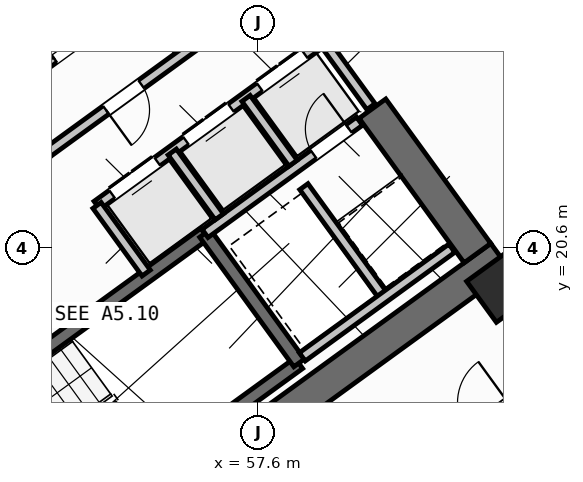
"""IFC4 building model, lengths in metres.
Left out: names, types, materials, properties, quantities, classifications, styles, units other than length and angle.
Written with IfcOpenShell. Run it as: python <this file> out.ifc"""

import sys

from ifc_helpers import new_model, si_unit, direction, frame, frame_2d, origin, origin_2d, place, context, subcontext, project, spatial, rectangle, hollow_rectangle, extrude, source, transform, mapped, element, fill, save


model = new_model("IFC4")
c1 = context("Model", 3, precision=1e-05, world=origin(), true_north=direction((0.0, 1.0)))
c2 = subcontext(c1, "Body", "Model", "MODEL_VIEW")
j1 = project(units=[si_unit("LENGTHUNIT", "METRE"), si_unit("PLANEANGLEUNIT", "RADIAN")], contexts=[c1])
p1 = place(None, origin())
s1 = spatial("IfcSite", under=j1, at=p1, CompositionType="ELEMENT")
p2 = place(p1, origin())
s2 = spatial("IfcBuilding", under=s1, at=p2, CompositionType="ELEMENT")
p3 = place(p2, frame((0.0, 0.0, 56.4)))
s3 = spatial("IfcBuildingStorey", under=s2, at=p3, CompositionType="ELEMENT", Elevation=56.4)
p4 = place(p3, frame((52.318, 13.11, 0.0), z_axis=(0.0, 0.0, 1.0), x_axis=(0.809019445368, 0.587781878776, 0.0)))
e1 = element("IfcWall", 1, at=p4, inside=s3, PredefinedType="SHEAR", context=c2, shape_type="SweptSolid", body=[
    extrude(rectangle(XDim=12.44, YDim=0.65, at=frame_2d((6.22, 0.0))), origin(), (0.0, 0.0, 1.0), 3.35),
])
p5 = place(p3, frame((44.325, 24.113, 0.0), z_axis=(0.0, 0.0, 1.0), x_axis=(0.809012664862, 0.58779121131, 0.0)))
e2 = element("IfcWall", 2, at=p5, inside=s3, PredefinedType="SHEAR", context=c2, shape_type="SweptSolid", body=[
    extrude(rectangle(XDim=12.44, YDim=0.65, at=frame_2d((6.22, 0.0))), origin(), (0.0, 0.0, 1.0), 3.35),
])
p6 = place(p3, frame((61.929, 20.494, 0.0), z_axis=(0.0, 0.0, 1.0), x_axis=(-0.58782982593, 0.808984607855, 0.0)))
e3 = element("IfcWall", 3, at=p6, inside=s3, PredefinedType="SHEAR", context=c2, shape_type="SweptSolid", body=[
    extrude(rectangle(XDim=3.525, YDim=0.65, at=frame_2d((1.762, 0.0))), origin(), (0.0, 0.0, 1.0), 3.35),
])
m1 = source(origin(), c2, "Body", "SweptSolid", [
    extrude(hollow_rectangle(XDim=1.0, YDim=1.0, WallThickness=0.04, at=origin_2d()), origin(), (0.0, 0.0, 1.0), 3.6),
])
p7 = place(p3, frame((62.414, 19.827, 0.0), z_axis=(0.0, 0.0, 1.0), x_axis=(0.809016994375, 0.587785252292, 0.0)))
e4 = element("IfcColumn", 4, at=p7, inside=s3, PredefinedType="COLUMN", context=c2, shape_type="MappedRepresentation", body=[
    mapped(m1, transform((0.0, 0.0, 0.0), scale=1.0)),
])
p8 = place(p3, frame((58.455, 35.484, 0.0), z_axis=(0.0, 0.0, 1.0), x_axis=(0.587783625747, -0.809018176127, 0.0)))
e5 = element("IfcWall", 5, at=p8, inside=s3, PredefinedType="STANDARD", context=c2, shape_type="SweptSolid", body=[
    extrude(rectangle(XDim=21.587, YDim=0.32, at=frame_2d((10.794, 0.0))), origin(), (0.0, 0.0, 1.0), 2.725),
])
p9 = place(p8, frame((1.54, 0.0, 0.85)))
e6 = element("IfcOpeningElement", 6, at=p9, cuts=e5, PredefinedType="OPENING", context=c2, shape_type="SweptSolid", body=[
    extrude(rectangle(XDim=1.5, YDim=1.5, at=frame_2d((0.75, 0.75))), frame((0.0, 0.17, 0.0), z_axis=(0.0, -1.0, 0.0), x_axis=(1.0, 0.0, 0.0)), (0.0, 0.0, 1.0), 0.34),
])
p10 = place(p8, frame((4.695, 0.0, 0.85)))
e7 = element("IfcOpeningElement", 7, at=p10, cuts=e5, PredefinedType="OPENING", context=c2, shape_type="SweptSolid", body=[
    extrude(rectangle(XDim=1.8, YDim=1.5, at=frame_2d((0.9, 0.75))), frame((0.0, 0.17, 0.0), z_axis=(0.0, -1.0, 0.0), x_axis=(1.0, 0.0, 0.0)), (0.0, 0.0, 1.0), 0.34),
])
p11 = place(p8, frame((13.009, 0.0, 1.0)))
e8 = element("IfcOpeningElement", 8, at=p11, cuts=e5, PredefinedType="OPENING", context=c2, shape_type="SweptSolid", body=[
    extrude(rectangle(XDim=0.9, YDim=1.25, at=frame_2d((0.45, 0.625))), frame((0.0, 0.17, 0.0), z_axis=(0.0, -1.0, 0.0), x_axis=(1.0, 0.0, 0.0)), (0.0, 0.0, 1.0), 0.34),
])
p12 = place(p8, frame((16.092, 0.0, 0.95)))
e9 = element("IfcOpeningElement", 9, at=p12, cuts=e5, PredefinedType="OPENING", context=c2, shape_type="SweptSolid", body=[
    extrude(rectangle(XDim=1.2, YDim=1.4, at=frame_2d((0.6, 0.7))), frame((0.0, 0.17, 0.0), z_axis=(0.0, -1.0, 0.0), x_axis=(1.0, 0.0, 0.0)), (0.0, 0.0, 1.0), 0.34),
])
p13 = place(p8, frame((19.085, 0.0, 1.0)))
e10 = element("IfcOpeningElement", 10, at=p13, cuts=e5, PredefinedType="OPENING", context=c2, shape_type="SweptSolid", body=[
    extrude(rectangle(XDim=0.9, YDim=1.25, at=frame_2d((0.45, 0.625))), frame((0.0, 0.17, 0.0), z_axis=(0.0, -1.0, 0.0), x_axis=(1.0, 0.0, 0.0)), (0.0, 0.0, 1.0), 0.34),
])
p14 = place(p3, frame((71.098, 17.731, 0.0), z_axis=(0.0, 0.0, 1.0), x_axis=(-0.809021120468, -0.587779573171, 0.0)))
e11 = element("IfcWall", 11, at=p14, inside=s3, PredefinedType="STANDARD", context=c2, shape_type="SweptSolid", body=[
    extrude(rectangle(XDim=17.588, YDim=0.32, at=frame_2d((8.794, 0.0))), origin(), (0.0, 0.0, 1.0), 3.35),
])
p15 = place(p14, frame((1.624, 0.0, 0.0)))
e12 = element("IfcOpeningElement", 12, at=p15, cuts=e11, PredefinedType="OPENING", context=c2, shape_type="SweptSolid", body=[
    extrude(rectangle(XDim=1.05, YDim=2.15, at=frame_2d((0.525, 1.075))), frame((0.0, 0.17, 0.0), z_axis=(0.0, -1.0, 0.0), x_axis=(1.0, 0.0, 0.0)), (0.0, 0.0, 1.0), 0.34),
])
p16 = place(p14, frame((4.104, 0.0, 1.0)))
e13 = element("IfcOpeningElement", 13, at=p16, cuts=e11, PredefinedType="OPENING", context=c2, shape_type="SweptSolid", body=[
    extrude(rectangle(XDim=0.9, YDim=1.25, at=frame_2d((0.45, 0.625))), frame((0.0, 0.17, 0.0), z_axis=(0.0, -1.0, 0.0), x_axis=(1.0, 0.0, 0.0)), (0.0, 0.0, 1.0), 0.34),
])
p17 = place(p14, frame((7.879, 0.0, 0.85)))
e14 = element("IfcOpeningElement", 14, at=p17, cuts=e11, PredefinedType="OPENING", context=c2, shape_type="SweptSolid", body=[
    extrude(rectangle(XDim=1.8, YDim=1.5, at=frame_2d((0.9, 0.75))), frame((0.0, 0.17, 0.0), z_axis=(0.0, -1.0, 0.0), x_axis=(1.0, 0.0, 0.0)), (0.0, 0.0, 1.0), 0.34),
])
p18 = place(p14, frame((13.529, 0.0, 0.85)))
e15 = element("IfcOpeningElement", 15, at=p18, cuts=e11, PredefinedType="OPENING", context=c2, shape_type="SweptSolid", body=[
    extrude(rectangle(XDim=1.5, YDim=1.5, at=frame_2d((0.75, 0.75))), frame((0.0, 0.17, 0.0), z_axis=(0.0, -1.0, 0.0), x_axis=(1.0, 0.0, 0.0)), (0.0, 0.0, 1.0), 0.34),
])
p19 = place(p3, frame((49.863, 23.44, 0.0), z_axis=(0.0, 0.0, 1.0), x_axis=(0.809003474932, 0.587803859759, 0.0)))
e16 = element("IfcWall", 16, at=p19, inside=s3, PredefinedType="SHEAR", context=c2, shape_type="SweptSolid", body=[
    extrude(rectangle(XDim=7.46, YDim=0.26, at=frame_2d((3.73, 0.0))), origin(), (0.0, 0.0, 1.0), 3.35),
])
p20 = place(p19, frame((0.36, 0.0, 0.0)))
e17 = element("IfcOpeningElement", 17, at=p20, cuts=e16, PredefinedType="OPENING", context=c2, shape_type="SweptSolid", body=[
    extrude(rectangle(XDim=0.86, YDim=2.05, at=frame_2d((0.43, 1.025))), frame((0.0, 0.14, 0.0), z_axis=(0.0, -1.0, 0.0), x_axis=(1.0, 0.0, 0.0)), (0.0, 0.0, 1.0), 0.28),
])
p21 = place(p3, frame((52.472, 14.013, 0.0), z_axis=(0.0, 0.0, 1.0), x_axis=(0.809028366311, 0.587769599847, 0.0)))
e18 = element("IfcWall", 18, at=p21, inside=s3, PredefinedType="SHEAR", context=c2, shape_type="SweptSolid", body=[
    extrude(rectangle(XDim=7.33, YDim=0.26, at=frame_2d((3.665, 0.0))), origin(), (0.0, 0.0, 1.0), 3.35),
])
p22 = place(p3, frame((50.615, 16.57, 0.0), z_axis=(0.0, 0.0, 1.0), x_axis=(0.809028366311, 0.587769599847, 0.0)))
e19 = element("IfcWall", 19, at=p22, inside=s3, PredefinedType="SHEAR", context=c2, shape_type="SweptSolid", body=[
    extrude(rectangle(XDim=7.33, YDim=0.26, at=frame_2d((3.665, 0.0))), origin(), (0.0, 0.0, 1.0), 3.35),
])
p23 = place(p22, frame((0.22, 0.0, 0.0)))
e20 = element("IfcOpeningElement", 20, at=p23, cuts=e19, PredefinedType="OPENING", context=c2, shape_type="SweptSolid", body=[
    extrude(rectangle(XDim=1.1, YDim=2.1, at=frame_2d((0.55, 1.05))), frame((0.0, 0.14, 0.0), z_axis=(0.0, -1.0, 0.0), x_axis=(1.0, 0.0, 0.0)), (0.0, 0.0, 1.0), 0.28),
])
p24 = place(p3, frame((58.41, 18.327, 0.0), z_axis=(0.0, 0.0, 1.0), x_axis=(-0.58776738483, 0.809029975545, 0.0)))
e21 = element("IfcWall", 21, at=p24, inside=s3, PredefinedType="SHEAR", context=c2, shape_type="SweptSolid", body=[
    extrude(rectangle(XDim=3.16, YDim=0.26, at=frame_2d((1.58, 0.0))), origin(), (0.0, 0.0, 1.0), 3.35),
])
p25 = place(p3, frame((56.553, 20.884, 0.0), z_axis=(0.0, 0.0, 1.0), x_axis=(0.809035789462, 0.587759382205, 0.0)))
e22 = element("IfcWall", 22, at=p25, inside=s3, PredefinedType="STANDARD", context=c2, shape_type="SweptSolid", body=[
    extrude(rectangle(XDim=3.768, YDim=0.2, at=frame_2d((1.884, 0.0))), origin(), (0.0, 0.0, 1.0), 3.34),
])
p26 = place(p25, frame((2.65, 0.0, 0.0)))
e23 = element("IfcOpeningElement", 23, at=p26, cuts=e22, PredefinedType="OPENING", context=c2, shape_type="SweptSolid", body=[
    extrude(rectangle(XDim=0.86, YDim=2.05, at=frame_2d((0.43, 1.025))), frame((0.0, 0.11, 0.0), z_axis=(0.0, -1.0, 0.0), x_axis=(1.0, 0.0, 0.0)), (0.0, 0.0, 1.0), 0.22),
])
p27 = place(p3, frame((54.421, 21.436, 0.0), z_axis=(0.0, 0.0, 1.0), x_axis=(0.809013710463, 0.587789772183, 0.0)))
e24 = element("IfcWall", 24, at=p27, inside=s3, PredefinedType="STANDARD", context=c2, shape_type="SweptSolid", body=[
    extrude(rectangle(XDim=5.36, YDim=0.2, at=frame_2d((2.68, 0.0))), origin(), (0.0, 0.0, 1.0), 3.34),
])
p28 = place(p27, frame((0.37, 0.0, 0.0)))
e25 = element("IfcOpeningElement", 25, at=p28, cuts=e24, PredefinedType="OPENING", context=c2, shape_type="SweptSolid", body=[
    extrude(rectangle(XDim=1.1, YDim=2.15, at=frame_2d((0.55, 1.075))), frame((0.0, 0.11, 0.0), z_axis=(0.0, -1.0, 0.0), x_axis=(1.0, 0.0, 0.0)), (0.0, 0.0, 1.0), 0.22),
])
p29 = place(p27, frame((2.17, 0.0, 0.0)))
e26 = element("IfcOpeningElement", 26, at=p29, cuts=e24, PredefinedType="OPENING", context=c2, shape_type="SweptSolid", body=[
    extrude(rectangle(XDim=1.1, YDim=2.15, at=frame_2d((0.55, 1.075))), frame((0.0, 0.11, 0.0), z_axis=(0.0, -1.0, 0.0), x_axis=(1.0, 0.0, 0.0)), (0.0, 0.0, 1.0), 0.22),
])
p30 = place(p27, frame((3.97, 0.0, 0.0)))
e27 = element("IfcOpeningElement", 27, at=p30, cuts=e24, PredefinedType="OPENING", context=c2, shape_type="SweptSolid", body=[
    extrude(rectangle(XDim=1.1, YDim=2.15, at=frame_2d((0.55, 1.075))), frame((0.0, 0.11, 0.0), z_axis=(0.0, -1.0, 0.0), x_axis=(1.0, 0.0, 0.0)), (0.0, 0.0, 1.0), 0.22),
])
p31 = place(p3, frame((55.391, 20.102, 0.0), z_axis=(0.0, 0.0, 1.0), x_axis=(-0.58778447739, 0.809017557374, 0.0)))
e28 = element("IfcWall", 28, at=p31, inside=s3, PredefinedType="STANDARD", context=c2, shape_type="SweptSolid", body=[
    extrude(rectangle(XDim=1.65, YDim=0.2, at=frame_2d((0.825, 0.0))), origin(), (0.0, 0.0, 1.0), 3.34),
])
p32 = place(p3, frame((56.834, 21.212, 0.0), z_axis=(0.0, 0.0, 1.0), x_axis=(-0.58776738483, 0.809029975545, 0.0)))
e29 = element("IfcWall", 29, at=p32, inside=s3, PredefinedType="STANDARD", context=c2, shape_type="SweptSolid", body=[
    extrude(rectangle(XDim=1.58, YDim=0.2, at=frame_2d((0.79, 0.0))), origin(), (0.0, 0.0, 1.0), 3.34),
])
p33 = place(p3, frame((58.29, 22.27, 0.0), z_axis=(0.0, 0.0, 1.0), x_axis=(-0.587840865826, 0.808976585857, 0.0)))
e30 = element("IfcWall", 30, at=p33, inside=s3, PredefinedType="STANDARD", context=c2, shape_type="SweptSolid", body=[
    extrude(rectangle(XDim=1.58, YDim=0.2, at=frame_2d((0.79, 0.0))), origin(), (0.0, 0.0, 1.0), 3.34),
])
p34 = place(p3, frame((60.067, 19.655, 0.0), z_axis=(0.0, 0.0, 1.0), x_axis=(-0.587800520745, 0.809005900975, 0.0)))
e31 = element("IfcWall", 31, at=p34, inside=s3, PredefinedType="STANDARD", context=c2, shape_type="SweptSolid", body=[
    extrude(rectangle(XDim=2.66, YDim=0.2, at=frame_2d((1.33, 0.0))), origin(), (0.0, 0.0, 1.0), 3.34),
])
p35 = place(p3, frame((58.472, 18.447, 0.0), z_axis=(0.0, 0.0, 1.0), x_axis=(0.809022487728, 0.587777691266, 0.0)))
e32 = element("IfcWall", 32, at=p35, inside=s3, PredefinedType="STANDARD", context=c2, shape_type="SweptSolid", body=[
    extrude(rectangle(XDim=3.648, YDim=0.2, at=frame_2d((1.824, 0.0))), origin(), (0.0, 0.0, 1.0), 3.34),
])
p36 = place(p3, frame((56.111, 24.419, 0.0), z_axis=(0.0, 0.0, 1.0), x_axis=(-0.58777848983, 0.809021907548, 0.0)))
e33 = element("IfcWall", 33, at=p36, inside=s3, PredefinedType="STANDARD", context=c2, shape_type="SweptSolid", body=[
    extrude(rectangle(XDim=2.88, YDim=0.2, at=frame_2d((1.44, 0.0))), origin(), (0.0, 0.0, 1.0), 3.34),
])
p37 = place(p3, frame((53.425, 22.468, 0.0), z_axis=(0.0, 0.0, 1.0), x_axis=(0.80902705128, 0.587771409902, 0.0)))
e34 = element("IfcWall", 34, at=p37, inside=s3, PredefinedType="STANDARD", context=c2, shape_type="SweptSolid", body=[
    extrude(rectangle(XDim=5.368, YDim=0.2, at=frame_2d((2.684, 0.0))), origin(), (0.0, 0.0, 1.0), 3.34),
])
p38 = place(p37, frame((4.28, 0.0, 0.0)))
e35 = element("IfcOpeningElement", 35, at=p38, cuts=e34, PredefinedType="OPENING", context=c2, shape_type="SweptSolid", body=[
    extrude(rectangle(XDim=0.86, YDim=2.05, at=frame_2d((0.43, 1.025))), frame((0.0, 0.11, 0.0), z_axis=(0.0, -1.0, 0.0), x_axis=(1.0, 0.0, 0.0)), (0.0, 0.0, 1.0), 0.22),
])
p39 = place(p37, frame((1.45, 0.0, 0.0)))
e36 = element("IfcOpeningElement", 36, at=p39, cuts=e34, PredefinedType="OPENING", context=c2, shape_type="SweptSolid", body=[
    extrude(rectangle(XDim=0.86, YDim=2.05, at=frame_2d((0.43, 1.025))), frame((0.0, 0.11, 0.0), z_axis=(0.0, -1.0, 0.0), x_axis=(1.0, 0.0, 0.0)), (0.0, 0.0, 1.0), 0.22),
])
p40 = place(p3, frame((52.618, 23.612, 0.0), z_axis=(0.0, 0.0, 1.0), x_axis=(0.809009587469, 0.587795446889, 0.0)))
e37 = element("IfcWall", 37, at=p40, inside=s3, PredefinedType="PLUMBINGWALL", context=c2, shape_type="SweptSolid", body=[
    extrude(rectangle(XDim=3.28, YDim=0.14, at=frame_2d((1.64, 0.0))), origin(), (0.0, 0.0, 1.0), 3.34),
])
p41 = place(p40, frame((1.2, 0.0, 0.0)))
e38 = element("IfcOpeningElement", 38, at=p41, cuts=e37, PredefinedType="OPENING", context=c2, shape_type="SweptSolid", body=[
    extrude(rectangle(XDim=0.78, YDim=2.05, at=frame_2d((0.39, 1.025))), frame((0.0, 0.08, 0.0), z_axis=(0.0, -1.0, 0.0), x_axis=(1.0, 0.0, 0.0)), (0.0, 0.0, 1.0), 0.16),
])
p42 = place(p3, frame((59.827, 23.386, 0.0), z_axis=(0.0, 0.0, 1.0), x_axis=(-0.587803840107, 0.809003489211, 0.0)))
e39 = element("IfcWall", 39, at=p42, inside=s3, PredefinedType="STANDARD", context=c2, shape_type="SweptSolid", body=[
    extrude(rectangle(XDim=2.96, YDim=0.2, at=frame_2d((1.48, 0.0))), origin(), (0.0, 0.0, 1.0), 3.34),
])
p43 = place(p42, frame((1.68, 0.0, 0.0)))
e40 = element("IfcOpeningElement", 40, at=p43, cuts=e39, PredefinedType="OPENING", context=c2, shape_type="SweptSolid", body=[
    extrude(rectangle(XDim=1.0, YDim=2.1, at=frame_2d((0.5, 1.05))), frame((0.0, 0.11, 0.0), z_axis=(0.0, -1.0, 0.0), x_axis=(1.0, 0.0, 0.0)), (0.0, 0.0, 1.0), 0.22),
])
p44 = place(p3, frame((53.705, 11.126, 0.0), z_axis=(0.0, 0.0, 1.0), x_axis=(0.809014504436, 0.587788679384, 0.0)))
e41 = element("IfcWall", 41, at=p44, inside=s3, PredefinedType="PARTITIONING", context=c2, shape_type="SweptSolid", body=[
    extrude(rectangle(XDim=14.67, YDim=0.16, at=frame_2d((7.335, 0.0))), origin(), (0.0, 0.0, 1.0), 3.34),
])
p45 = place(p44, frame((3.215, 0.0, 0.0)))
e42 = element("IfcOpeningElement", 42, at=p45, cuts=e41, PredefinedType="OPENING", context=c2, shape_type="SweptSolid", body=[
    extrude(rectangle(XDim=1.0, YDim=2.1, at=frame_2d((0.5, 1.05))), frame((0.0, 0.09, 0.0), z_axis=(0.0, -1.0, 0.0), x_axis=(1.0, 0.0, 0.0)), (0.0, 0.0, 1.0), 0.18),
])
p46 = place(p44, frame((9.915, 0.0, 0.0)))
e43 = element("IfcOpeningElement", 43, at=p46, cuts=e41, PredefinedType="OPENING", context=c2, shape_type="SweptSolid", body=[
    extrude(rectangle(XDim=1.0, YDim=2.1, at=frame_2d((0.5, 1.05))), frame((0.0, 0.09, 0.0), z_axis=(0.0, -1.0, 0.0), x_axis=(1.0, 0.0, 0.0)), (0.0, 0.0, 1.0), 0.18),
])
m2 = source(origin(), c2, "Body", "SweptSolid", [
    extrude(rectangle(XDim=1.1, YDim=2.15, at=frame_2d((0.55, 1.075))), frame((0.0, 0.025, 0.0), z_axis=(0.0, -1.0, 0.0), x_axis=(1.0, 0.0, 0.0)), (0.0, 0.0, 1.0), 0.05),
])
p47 = place(p28, origin())
e44 = element("IfcDoor", 44, at=p47, inside=s3, OperationType="DOUBLE_DOOR_SLIDING", PredefinedType="DOOR", context=c2, shape_type="MappedRepresentation", body=[
    mapped(m2, transform((0.0, 0.0, 0.0), scale=1.0)),
])
fill(e25, e44)
p48 = place(p29, origin())
e45 = element("IfcDoor", 45, at=p48, inside=s3, OperationType="DOUBLE_DOOR_SLIDING", PredefinedType="DOOR", context=c2, shape_type="MappedRepresentation", body=[
    mapped(m2, transform((0.0, 0.0, 0.0), scale=1.0)),
])
fill(e26, e45)
p49 = place(p30, origin())
e46 = element("IfcDoor", 46, at=p49, inside=s3, OperationType="DOUBLE_DOOR_SLIDING", PredefinedType="DOOR", context=c2, shape_type="MappedRepresentation", body=[
    mapped(m2, transform((0.0, 0.0, 0.0), scale=1.0)),
])
fill(e27, e46)
m3 = source(origin(), c2, "Body", "SweptSolid", [
    extrude(rectangle(XDim=0.86, YDim=2.05, at=frame_2d((0.43, 1.025))), frame((0.0, 0.025, 0.0), z_axis=(0.0, -1.0, 0.0), x_axis=(1.0, 0.0, 0.0)), (0.0, 0.0, 1.0), 0.05),
])
p50 = place(p26, origin())
e47 = element("IfcDoor", 47, at=p50, inside=s3, OperationType="SINGLE_SWING_RIGHT", PredefinedType="DOOR", context=c2, shape_type="MappedRepresentation", body=[
    mapped(m3, transform((0.0, 0.0, 0.0), scale=1.0)),
])
fill(e23, e47)
p51 = place(p39, frame((0.86, 0.0, 0.0), z_axis=(0.0, 0.0, 1.0), x_axis=(-1.0, 0.0, 0.0)))
e48 = element("IfcDoor", 48, at=p51, inside=s3, OperationType="SINGLE_SWING_RIGHT", PredefinedType="DOOR", context=c2, shape_type="MappedRepresentation", body=[
    mapped(m3, transform((0.0, 0.0, 0.0), scale=1.0)),
])
fill(e36, e48)
m4 = source(origin(), c2, "Body", "SweptSolid", [
    extrude(rectangle(XDim=0.78, YDim=2.05, at=frame_2d((0.39, 1.025))), frame((0.0, 0.025, 0.0), z_axis=(0.0, -1.0, 0.0), x_axis=(1.0, 0.0, 0.0)), (0.0, 0.0, 1.0), 0.05),
])
p52 = place(p41, origin())
e49 = element("IfcDoor", 49, at=p52, inside=s3, OperationType="SINGLE_SWING_LEFT", PredefinedType="DOOR", context=c2, shape_type="MappedRepresentation", body=[
    mapped(m4, transform((0.0, 0.0, 0.0), scale=1.0)),
])
fill(e38, e49)
m5 = source(origin(), c2, "Body", "SweptSolid", [
    extrude(rectangle(XDim=1.0, YDim=2.1, at=frame_2d((0.5, 1.05))), frame((0.0, 0.025, 0.0), z_axis=(0.0, -1.0, 0.0), x_axis=(1.0, 0.0, 0.0)), (0.0, 0.0, 1.0), 0.05),
])
p53 = place(p46, origin())
e50 = element("IfcDoor", 50, at=p53, inside=s3, OperationType="SINGLE_SWING_RIGHT", PredefinedType="DOOR", context=c2, shape_type="MappedRepresentation", body=[
    mapped(m5, transform((0.0, 0.0, 0.0), scale=1.0)),
])
fill(e43, e50)
save(model, sys.argv[1])
